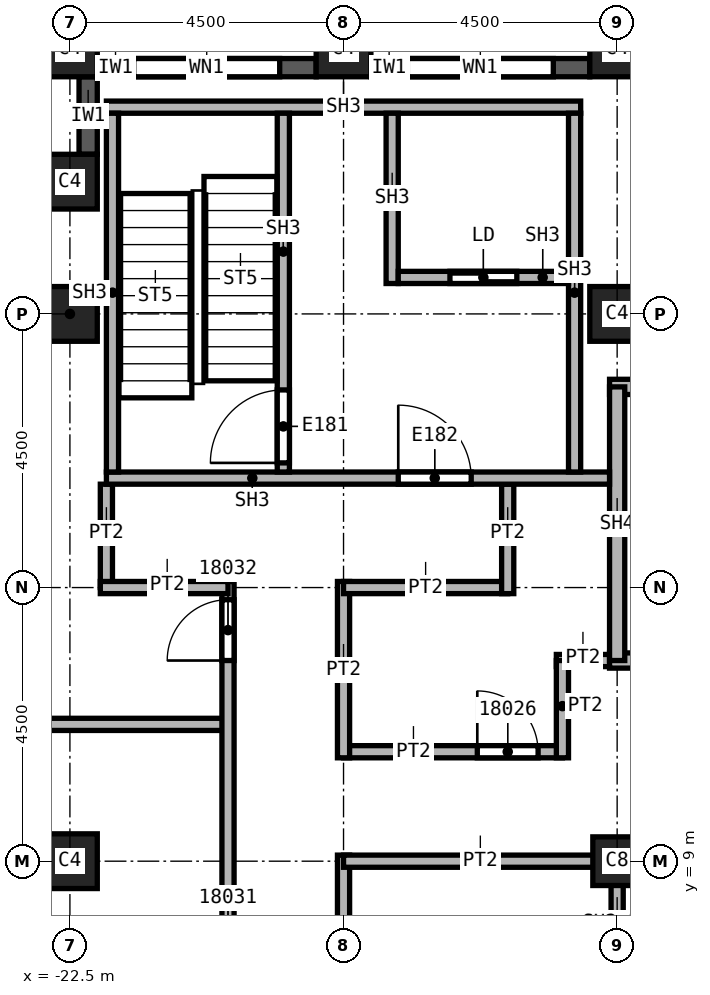
"""IFC4 building model, lengths in metres.
Left out: names, types, materials, properties, quantities, classifications, styles, units other than length and angle.
Written with IfcOpenShell. Run it as: python <this file> out.ifc"""

import sys

from ifc_helpers import new_model, si_unit, direction, frame, frame_2d, origin, origin_2d, place, context, subcontext, project, spatial, rectangle, extrude, element, fill, save


model = new_model("IFC4")
c1 = context("Model", 3, precision=1e-05, world=origin(), true_north=direction((0.0, 1.0)))
c2 = subcontext(c1, "Body", "Model", "MODEL_VIEW")
j1 = project(units=[si_unit("LENGTHUNIT", "METRE"), si_unit("PLANEANGLEUNIT", "RADIAN")], contexts=[c1])
p1 = place(None, origin())
s1 = spatial("IfcSite", under=j1, at=p1, CompositionType="ELEMENT")
p2 = place(p1, origin())
s2 = spatial("IfcBuilding", under=s1, at=p2, CompositionType="ELEMENT")
p3 = place(p2, frame((0.0, 0.0, 266.0)))
s3 = spatial("IfcBuildingStorey", under=s2, at=p3, CompositionType="ELEMENT", Elevation=266.0)
for number, where, z_axis, x_axis in (
    (1, (-13.5, 18.0, 0.0), (0.0, 0.0, 1.0), (1.0, 0.0, 0.0)),
    (2, (-22.5, 9.0, 0.0), (0.0, 0.0, 1.0), (1.0, 0.0, 0.0)),
    (3, (-22.5, 18.0, 0.0), (0.0, 0.0, 1.0), (1.0, 0.0, 0.0)),
):
    element("IfcColumn", number, at=place(p3, frame(where, z_axis=z_axis, x_axis=x_axis)), inside=s3, PredefinedType="COLUMN", context=c2, shape_type="SweptSolid", body=[
        extrude(rectangle(XDim=0.9, YDim=0.9, at=origin_2d()), origin(), (0.0, 0.0, 1.0), 3.72),
    ])
p4 = place(p3, frame((-13.5, 9.0, 0.0), z_axis=(0.0, 0.0, 1.0), x_axis=(1.0, 0.0, 0.0)))
e4 = element("IfcColumn", 4, at=p4, inside=s3, PredefinedType="COLUMN", context=c2, shape_type="SweptSolid", body=[
    extrude(rectangle(XDim=0.8, YDim=0.8, at=origin_2d()), origin(), (0.0, 0.0, 1.0), 3.72),
])
for number, where, z_axis, x_axis in (
    (5, (-13.5, 22.35, 0.0), (0.0, 0.0, 1.0), (1.0, 0.0, 0.0)),
    (6, (-18.0, 22.35, 0.0), (0.0, 0.0, 1.0), (1.0, 0.0, 0.0)),
    (7, (-22.5, 22.35, 0.0), (0.0, 0.0, 1.0), (1.0, 0.0, 0.0)),
    (8, (-22.5, 20.175, 0.0), (0.0, 0.0, 1.0), (1.0, 0.0, 0.0)),
):
    element("IfcColumn", number, at=place(p3, frame(where, z_axis=z_axis, x_axis=x_axis)), inside=s3, PredefinedType="COLUMN", context=c2, shape_type="SweptSolid", body=[
        extrude(rectangle(XDim=0.9, YDim=0.9, at=origin_2d()), origin(), (0.0, 0.0, 1.0), 3.72),
    ])
p5 = place(p3, frame((-13.95, 22.05, 0.0), z_axis=(0.0, 0.0, 1.0), x_axis=(-1.0, 0.0, 0.0)))
e9 = element("IfcWall", 9, at=p5, inside=s3, PredefinedType="SOLIDWALL", context=c2, shape_type="SweptSolid", body=[
    extrude(rectangle(XDim=3.6, YDim=0.3, at=frame_2d((1.8, 0.0))), origin(), (0.0, 0.0, 1.0), 3.12),
])
p6 = place(p5, frame((0.6, 0.0, 0.8)))
e10 = element("IfcOpeningElement", 10, at=p6, cuts=e9, PredefinedType="OPENING", context=c2, shape_type="SweptSolid", body=[
    extrude(rectangle(XDim=2.4, YDim=1.95, at=frame_2d((1.2, 0.975))), frame((0.0, 0.15, 0.0), z_axis=(0.0, -1.0, 0.0), x_axis=(1.0, 0.0, 0.0)), (0.0, 0.0, 1.0), 0.3),
])
p7 = place(p3, frame((-18.45, 22.05, 0.0), z_axis=(0.0, 0.0, 1.0), x_axis=(-1.0, 0.0, 0.0)))
e11 = element("IfcWall", 11, at=p7, inside=s3, PredefinedType="SOLIDWALL", context=c2, shape_type="SweptSolid", body=[
    extrude(rectangle(XDim=3.6, YDim=0.3, at=frame_2d((1.8, 0.0))), origin(), (0.0, 0.0, 1.0), 3.12),
])
p8 = place(p7, frame((0.6, 0.0, 0.8)))
e12 = element("IfcOpeningElement", 12, at=p8, cuts=e11, PredefinedType="OPENING", context=c2, shape_type="SweptSolid", body=[
    extrude(rectangle(XDim=2.4, YDim=1.95, at=frame_2d((1.2, 0.975))), frame((0.0, 0.15, 0.0), z_axis=(0.0, -1.0, 0.0), x_axis=(1.0, 0.0, 0.0)), (0.0, 0.0, 1.0), 0.3),
])
p9 = place(p3, frame((-22.2, 21.9, 0.0), z_axis=(0.0, 0.0, 1.0), x_axis=(0.0, -1.0, 0.0)))
e13 = element("IfcWall", 13, at=p9, inside=s3, PredefinedType="SOLIDWALL", context=c2, shape_type="SweptSolid", body=[
    extrude(rectangle(XDim=1.275, YDim=0.3, at=frame_2d((0.637, 0.0))), origin(), (0.0, 0.0, 1.0), 3.12),
])
p10 = place(p3, frame((-26.55, 11.25, 0.0), z_axis=(0.0, 0.0, 1.0), x_axis=(1.0, 0.0, 0.0)))
e14 = element("IfcWall", 14, at=p10, inside=s3, PredefinedType="PARTITIONING", context=c2, shape_type="SweptSolid", body=[
    extrude(rectangle(XDim=6.65, YDim=0.2, at=frame_2d((3.325, 0.0))), origin(), (0.0, 0.0, 1.0), 3.72),
])
p11 = place(p3, frame((-21.9, 13.5, 0.0), z_axis=(0.0, 0.0, 1.0), x_axis=(0.0, 1.0, 0.0)))
e15 = element("IfcWall", 15, at=p11, inside=s3, PredefinedType="PARTITIONING", context=c2, shape_type="SweptSolid", body=[
    extrude(rectangle(XDim=1.7, YDim=0.2, at=frame_2d((0.85, 0.0))), origin(), (0.0, 0.0, 1.0), 3.72),
])
p12 = place(p3, frame((-19.9, -21.9, 0.0), z_axis=(0.0, 0.0, 1.0), x_axis=(0.0, 1.0, 0.0)))
e16 = element("IfcWall", 16, at=p12, inside=s3, PredefinedType="PARTITIONING", context=c2, shape_type="SweptSolid", body=[
    extrude(rectangle(XDim=35.5, YDim=0.2, at=frame_2d((17.75, 0.0))), origin(), (0.0, 0.0, 1.0), 3.72),
])
p13 = place(p12, frame((22.95, 0.0, 0.0)))
e17 = element("IfcOpeningElement", 17, at=p13, cuts=e16, PredefinedType="OPENING", context=c2, shape_type="SweptSolid", body=[
    extrude(rectangle(XDim=1.0, YDim=2.1, at=frame_2d((0.5, 1.05))), frame((0.0, 0.1, 0.0), z_axis=(0.0, -1.0, 0.0), x_axis=(1.0, 0.0, 0.0)), (0.0, 0.0, 1.0), 0.2),
])
p14 = place(p12, frame((28.8, 0.0, 0.0)))
e18 = element("IfcOpeningElement", 18, at=p14, cuts=e16, PredefinedType="OPENING", context=c2, shape_type="SweptSolid", body=[
    extrude(rectangle(XDim=1.0, YDim=2.1, at=frame_2d((0.5, 1.05))), frame((0.0, 0.1, 0.0), z_axis=(0.0, -1.0, 0.0), x_axis=(1.0, 0.0, 0.0)), (0.0, 0.0, 1.0), 0.2),
])
p15 = place(p12, frame((34.2, 0.0, 0.0)))
e19 = element("IfcOpeningElement", 19, at=p15, cuts=e16, PredefinedType="OPENING", context=c2, shape_type="SweptSolid", body=[
    extrude(rectangle(XDim=1.0, YDim=2.1, at=frame_2d((0.5, 1.05))), frame((0.0, 0.1, 0.0), z_axis=(0.0, -1.0, 0.0), x_axis=(1.0, 0.0, 0.0)), (0.0, 0.0, 1.0), 0.2),
])
p16 = place(p12, frame((4.45, 0.0, 0.0)))
e20 = element("IfcOpeningElement", 20, at=p16, cuts=e16, PredefinedType="OPENING", context=c2, shape_type="SweptSolid", body=[
    extrude(rectangle(XDim=1.0, YDim=2.1, at=frame_2d((0.5, 1.05))), frame((0.0, 0.1, 0.0), z_axis=(0.0, -1.0, 0.0), x_axis=(1.0, 0.0, 0.0)), (0.0, 0.0, 1.0), 0.2),
])
p17 = place(p12, frame((14.4, 0.0, 0.0)))
e21 = element("IfcOpeningElement", 21, at=p17, cuts=e16, PredefinedType="OPENING", context=c2, shape_type="SweptSolid", body=[
    extrude(rectangle(XDim=1.0, YDim=2.1, at=frame_2d((0.5, 1.05))), frame((0.0, 0.1, 0.0), z_axis=(0.0, -1.0, 0.0), x_axis=(1.0, 0.0, 0.0)), (0.0, 0.0, 1.0), 0.2),
])
p18 = place(p3, frame((-19.9, 13.5, 0.0), z_axis=(0.0, 0.0, 1.0), x_axis=(-1.0, 0.0, 0.0)))
e22 = element("IfcWall", 22, at=p18, inside=s3, PredefinedType="PARTITIONING", context=c2, shape_type="SweptSolid", body=[
    extrude(rectangle(XDim=2.1, YDim=0.2, at=frame_2d((1.05, 0.0))), origin(), (0.0, 0.0, 1.0), 3.72),
])
p19 = place(p3, frame((-18.0, 9.1, 0.0), z_axis=(0.0, 0.0, 1.0), x_axis=(0.0, -1.0, 0.0)))
e23 = element("IfcWall", 23, at=p19, inside=s3, PredefinedType="PARTITIONING", context=c2, shape_type="SweptSolid", body=[
    extrude(rectangle(XDim=18.2, YDim=0.2, at=frame_2d((9.1, 0.0))), origin(), (0.0, 0.0, 1.0), 3.72),
])
p20 = place(p19, frame((12.25, 0.0, 0.0)))
e24 = element("IfcOpeningElement", 24, at=p20, cuts=e23, PredefinedType="OPENING", context=c2, shape_type="SweptSolid", body=[
    extrude(rectangle(XDim=1.0, YDim=2.1, at=frame_2d((0.5, 1.05))), frame((0.0, 0.1, 0.0), z_axis=(0.0, -1.0, 0.0), x_axis=(1.0, 0.0, 0.0)), (0.0, 0.0, 1.0), 0.2),
])
p21 = place(p19, frame((2.35, 0.0, 0.0)))
e25 = element("IfcOpeningElement", 25, at=p21, cuts=e23, PredefinedType="OPENING", context=c2, shape_type="SweptSolid", body=[
    extrude(rectangle(XDim=1.0, YDim=2.1, at=frame_2d((0.5, 1.05))), frame((0.0, 0.1, 0.0), z_axis=(0.0, -1.0, 0.0), x_axis=(1.0, 0.0, 0.0)), (0.0, 0.0, 1.0), 0.2),
])
p22 = place(p3, frame((-18.0, 10.8, 0.0), z_axis=(0.0, 0.0, 1.0), x_axis=(1.0, 0.0, 0.0)))
e26 = element("IfcWall", 26, at=p22, inside=s3, PredefinedType="PARTITIONING", context=c2, shape_type="SweptSolid", body=[
    extrude(rectangle(XDim=3.6, YDim=0.2, at=frame_2d((1.8, 0.0))), origin(), (0.0, 0.0, 1.0), 3.72),
])
p23 = place(p22, frame((2.2, 0.0, 0.0)))
e27 = element("IfcOpeningElement", 27, at=p23, cuts=e26, PredefinedType="OPENING", context=c2, shape_type="SweptSolid", body=[
    extrude(rectangle(XDim=1.0, YDim=2.1, at=frame_2d((0.5, 1.05))), frame((0.0, 0.1, 0.0), z_axis=(0.0, -1.0, 0.0), x_axis=(1.0, 0.0, 0.0)), (0.0, 0.0, 1.0), 0.2),
])
p24 = place(p3, frame((-18.0, 13.6, 0.0), z_axis=(0.0, 0.0, 1.0), x_axis=(0.0, -1.0, 0.0)))
e28 = element("IfcWall", 28, at=p24, inside=s3, PredefinedType="PARTITIONING", context=c2, shape_type="SweptSolid", body=[
    extrude(rectangle(XDim=2.9, YDim=0.2, at=frame_2d((1.45, 0.0))), origin(), (0.0, 0.0, 1.0), 3.72),
])
p25 = place(p3, frame((-15.3, 13.5, 0.0), z_axis=(0.0, 0.0, 1.0), x_axis=(-1.0, 0.0, 0.0)))
e29 = element("IfcWall", 29, at=p25, inside=s3, PredefinedType="PARTITIONING", context=c2, shape_type="SweptSolid", body=[
    extrude(rectangle(XDim=2.7, YDim=0.2, at=frame_2d((1.35, 0.0))), origin(), (0.0, 0.0, 1.0), 3.72),
])
p26 = place(p3, frame((-15.3, 15.2, 0.0), z_axis=(0.0, 0.0, 1.0), x_axis=(0.0, -1.0, 0.0)))
e30 = element("IfcWall", 30, at=p26, inside=s3, PredefinedType="PARTITIONING", context=c2, shape_type="SweptSolid", body=[
    extrude(rectangle(XDim=1.8, YDim=0.2, at=frame_2d((0.9, 0.0))), origin(), (0.0, 0.0, 1.0), 3.72),
])
p27 = place(p3, frame((-14.5, 12.3, 0.0), z_axis=(0.0, 0.0, 1.0), x_axis=(1.0, 0.0, 0.0)))
e31 = element("IfcWall", 31, at=p27, inside=s3, PredefinedType="PARTITIONING", context=c2, shape_type="SweptSolid", body=[
    extrude(rectangle(XDim=1.125, YDim=0.2, at=frame_2d((0.562, 0.0))), origin(), (0.0, 0.0, 1.0), 3.72),
])
p28 = place(p3, frame((-13.5, 9.0, 0.0), z_axis=(0.0, 0.0, 1.0), x_axis=(-1.0, 0.0, 0.0)))
e32 = element("IfcWall", 32, at=p28, inside=s3, PredefinedType="PARTITIONING", context=c2, shape_type="SweptSolid", body=[
    extrude(rectangle(XDim=4.5, YDim=0.2, at=frame_2d((2.25, 0.0))), origin(), (0.0, 0.0, 1.0), 3.72),
])
p29 = place(p3, frame((-14.4, 10.7, 0.0), z_axis=(0.0, 0.0, 1.0), x_axis=(0.0, 1.0, 0.0)))
e33 = element("IfcWall", 33, at=p29, inside=s3, PredefinedType="PARTITIONING", context=c2, shape_type="SweptSolid", body=[
    extrude(rectangle(XDim=1.6, YDim=0.2, at=frame_2d((0.8, 0.0))), origin(), (0.0, 0.0, 1.0), 3.72),
])
p30 = place(p3, frame((-13.6, 9.0, 0.0), z_axis=(0.0, 0.0, 1.0), x_axis=(1.0, 0.0, 0.0)))
e34 = element("IfcWall", 34, at=p30, inside=s3, PredefinedType="SOLIDWALL", context=c2, shape_type="SweptSolid", body=[
    extrude(rectangle(XDim=3.1, YDim=0.2, at=frame_2d((1.55, 0.0))), origin(), (0.0, 0.0, 1.0), 3.042),
])
p31 = place(p30, frame((0.85, 0.0, 0.0)))
e35 = element("IfcOpeningElement", 35, at=p31, cuts=e34, PredefinedType="OPENING", context=c2, shape_type="SweptSolid", body=[
    extrude(rectangle(XDim=1.1, YDim=2.1, at=frame_2d((0.55, 1.05))), frame((0.0, 0.1, 0.0), z_axis=(0.0, -1.0, 0.0), x_axis=(1.0, 0.0, 0.0)), (0.0, 0.0, 1.0), 0.2),
])
p32 = place(p3, frame((-13.5, 7.0, 0.0), z_axis=(0.0, 0.0, 1.0), x_axis=(0.0, 1.0, 0.0)))
e36 = element("IfcWall", 36, at=p32, inside=s3, PredefinedType="SOLIDWALL", context=c2, shape_type="SweptSolid", body=[
    extrude(rectangle(XDim=2.1, YDim=0.2, at=frame_2d((1.05, 0.0))), origin(), (0.0, 0.0, 1.0), 3.042),
])
p33 = place(p3, frame((-13.625, 12.3, 0.0), z_axis=(0.0, 0.0, 1.0), x_axis=(1.0, 0.0, 0.0)))
e37 = element("IfcWall", 37, at=p33, inside=s3, PredefinedType="SOLIDWALL", context=c2, shape_type="SweptSolid", body=[
    extrude(rectangle(XDim=9.25, YDim=0.25, at=frame_2d((4.625, 0.0))), origin(), (0.0, 0.0, 1.0), 3.72),
])
p34 = place(p33, frame((0.85, 0.0, 0.0)))
e38 = element("IfcOpeningElement", 38, at=p34, cuts=e37, PredefinedType="OPENING", context=c2, shape_type="SweptSolid", body=[
    extrude(rectangle(XDim=1.2, YDim=2.1, at=frame_2d((0.6, 1.05))), frame((0.0, 0.125, 0.0), z_axis=(0.0, -1.0, 0.0), x_axis=(1.0, 0.0, 0.0)), (0.0, 0.0, 1.0), 0.25),
])
p35 = place(p3, frame((-13.625, 16.8, 0.0), z_axis=(0.0, 0.0, 1.0), x_axis=(1.0, 0.0, 0.0)))
e39 = element("IfcWall", 39, at=p35, inside=s3, PredefinedType="SOLIDWALL", context=c2, shape_type="SweptSolid", body=[
    extrude(rectangle(XDim=9.25, YDim=0.25, at=frame_2d((4.625, 0.0))), origin(), (0.0, 0.0, 1.0), 3.72),
])
p36 = place(p3, frame((-13.5, 12.3, 0.0), z_axis=(0.0, 0.0, 1.0), x_axis=(0.0, 1.0, 0.0)))
e40 = element("IfcWall", 40, at=p36, inside=s3, PredefinedType="SOLIDWALL", context=c2, shape_type="SweptSolid", body=[
    extrude(rectangle(XDim=4.5, YDim=0.25, at=frame_2d((2.25, 0.0))), origin(), (0.0, 0.0, 1.0), 3.72),
])
p37 = place(p3, frame((-21.9, 15.3, 0.0), z_axis=(0.0, 0.0, 1.0), x_axis=(1.0, 0.0, 0.0)))
e41 = element("IfcWall", 41, at=p37, inside=s3, PredefinedType="SOLIDWALL", context=c2, shape_type="SweptSolid", body=[
    extrude(rectangle(XDim=8.275, YDim=0.2, at=frame_2d((4.137, 0.0))), origin(), (0.0, 0.0, 1.0), 3.72),
])
p38 = place(p37, frame((4.8, 0.0, 0.0)))
e42 = element("IfcOpeningElement", 42, at=p38, cuts=e41, PredefinedType="OPENING", context=c2, shape_type="SweptSolid", body=[
    extrude(rectangle(XDim=1.2, YDim=2.1, at=frame_2d((0.6, 1.05))), frame((0.0, 0.1, 0.0), z_axis=(0.0, -1.0, 0.0), x_axis=(1.0, 0.0, 0.0)), (0.0, 0.0, 1.0), 0.2),
])
p39 = place(p3, frame((-21.9, 21.4, 0.0), z_axis=(0.0, 0.0, 1.0), x_axis=(1.0, 0.0, 0.0)))
e43 = element("IfcWall", 43, at=p39, inside=s3, PredefinedType="SOLIDWALL", context=c2, shape_type="SweptSolid", body=[
    extrude(rectangle(XDim=7.8, YDim=0.2, at=frame_2d((3.9, 0.0))), origin(), (0.0, 0.0, 1.0), 3.72),
])
for number, where, z_axis, x_axis in (
    (44, (-21.8, 15.4, 0.0), (0.0, 0.0, 1.0), (0.0, 1.0, 0.0)),
    (45, (-14.2, 15.4, 0.0), (0.0, 0.0, 1.0), (0.0, 1.0, 0.0)),
):
    element("IfcWall", number, at=place(p3, frame(where, z_axis=z_axis, x_axis=x_axis)), inside=s3, PredefinedType="SOLIDWALL", context=c2, shape_type="SweptSolid", body=[
        extrude(rectangle(XDim=5.9, YDim=0.2, at=frame_2d((2.95, 0.0))), origin(), (0.0, 0.0, 1.0), 3.72),
    ])
p40 = place(p3, frame((-18.99, 15.4, 0.0), z_axis=(0.0, 0.0, 1.0), x_axis=(0.0, 1.0, 0.0)))
e46 = element("IfcWall", 46, at=p40, inside=s3, PredefinedType="SOLIDWALL", context=c2, shape_type="SweptSolid", body=[
    extrude(rectangle(XDim=5.9, YDim=0.2, at=frame_2d((2.95, 0.0))), origin(), (0.0, 0.0, 1.0), 3.72),
])
p41 = place(p40, frame((0.15, 0.0, 0.0)))
e47 = element("IfcOpeningElement", 47, at=p41, cuts=e46, PredefinedType="OPENING", context=c2, shape_type="SweptSolid", body=[
    extrude(rectangle(XDim=1.2, YDim=2.1, at=frame_2d((0.6, 1.05))), frame((0.0, 0.1, 0.0), z_axis=(0.0, -1.0, 0.0), x_axis=(1.0, 0.0, 0.0)), (0.0, 0.0, 1.0), 0.2),
])
p42 = place(p3, frame((-17.2, 18.5, 0.0), z_axis=(0.0, 0.0, 1.0), x_axis=(0.0, 1.0, 0.0)))
e48 = element("IfcWall", 48, at=p42, inside=s3, PredefinedType="SOLIDWALL", context=c2, shape_type="SweptSolid", body=[
    extrude(rectangle(XDim=2.8, YDim=0.2, at=frame_2d((1.4, 0.0))), origin(), (0.0, 0.0, 1.0), 3.72),
])
p43 = place(p3, frame((-17.1, 18.6, 0.0), z_axis=(0.0, 0.0, 1.0), x_axis=(1.0, 0.0, 0.0)))
e49 = element("IfcWall", 49, at=p43, inside=s3, PredefinedType="SOLIDWALL", context=c2, shape_type="SweptSolid", body=[
    extrude(rectangle(XDim=2.8, YDim=0.2, at=frame_2d((1.4, 0.0))), origin(), (0.0, 0.0, 1.0), 3.72),
])
p44 = place(p43, frame((0.85, 0.0, 0.0)))
e50 = element("IfcOpeningElement", 50, at=p44, cuts=e49, PredefinedType="OPENING", context=c2, shape_type="SweptSolid", body=[
    extrude(rectangle(XDim=1.1, YDim=2.1, at=frame_2d((0.55, 1.05))), frame((0.0, 0.1, 0.0), z_axis=(0.0, -1.0, 0.0), x_axis=(1.0, 0.0, 0.0)), (0.0, 0.0, 1.0), 0.2),
])
p45 = place(p6, origin())
e51 = element("IfcWindow", 51, at=p45, inside=s3, PartitioningType="SINGLE_PANEL", PredefinedType="WINDOW", context=c2, shape_type="SweptSolid", body=[
    extrude(rectangle(XDim=2.4, YDim=1.95, at=frame_2d((1.2, 0.975))), frame((0.0, 0.03, 0.0), z_axis=(0.0, -1.0, 0.0), x_axis=(1.0, 0.0, 0.0)), (0.0, 0.0, 1.0), 0.06),
])
fill(e10, e51)
p46 = place(p8, origin())
e52 = element("IfcWindow", 52, at=p46, inside=s3, PartitioningType="SINGLE_PANEL", PredefinedType="WINDOW", context=c2, shape_type="SweptSolid", body=[
    extrude(rectangle(XDim=2.4, YDim=1.95, at=frame_2d((1.2, 0.975))), frame((0.0, 0.03, 0.0), z_axis=(0.0, -1.0, 0.0), x_axis=(1.0, 0.0, 0.0)), (0.0, 0.0, 1.0), 0.06),
])
fill(e12, e52)
p47 = place(p23, origin())
e53 = element("IfcDoor", 53, at=p47, inside=s3, OperationType="SINGLE_SWING_LEFT", PredefinedType="DOOR", context=c2, shape_type="SweptSolid", body=[
    extrude(rectangle(XDim=1.0, YDim=2.1, at=frame_2d((0.5, 1.05))), frame((0.0, 0.025, 0.0), z_axis=(0.0, -1.0, 0.0), x_axis=(1.0, 0.0, 0.0)), (0.0, 0.0, 1.0), 0.05),
])
fill(e27, e53)
p48 = place(p15, origin())
e54 = element("IfcDoor", 54, at=p48, inside=s3, OperationType="SINGLE_SWING_LEFT", PredefinedType="DOOR", context=c2, shape_type="SweptSolid", body=[
    extrude(rectangle(XDim=1.0, YDim=2.1, at=frame_2d((0.5, 1.05))), frame((0.0, 0.025, 0.0), z_axis=(0.0, -1.0, 0.0), x_axis=(1.0, 0.0, 0.0)), (0.0, 0.0, 1.0), 0.05),
])
fill(e19, e54)
p49 = place(p41, origin())
e55 = element("IfcDoor", 55, at=p49, inside=s3, OperationType="SINGLE_SWING_LEFT", PredefinedType="DOOR", context=c2, shape_type="SweptSolid", body=[
    extrude(rectangle(XDim=1.2, YDim=2.1, at=frame_2d((0.6, 1.05))), frame((0.0, 0.025, 0.0), z_axis=(0.0, -1.0, 0.0), x_axis=(1.0, 0.0, 0.0)), (0.0, 0.0, 1.0), 0.05),
])
fill(e47, e55)
p50 = place(p44, origin())
e56 = element("IfcDoor", 56, at=p50, inside=s3, OperationType="SLIDING_TO_LEFT", PredefinedType="DOOR", context=c2, shape_type="SweptSolid", body=[
    extrude(rectangle(XDim=1.1, YDim=2.1, at=frame_2d((0.55, 1.05))), frame((0.0, 0.025, 0.0), z_axis=(0.0, -1.0, 0.0), x_axis=(1.0, 0.0, 0.0)), (0.0, 0.0, 1.0), 0.05),
])
fill(e50, e56)
p51 = place(p38, origin())
e57 = element("IfcDoor", 57, at=p51, inside=s3, OperationType="SINGLE_SWING_RIGHT", PredefinedType="DOOR", context=c2, shape_type="SweptSolid", body=[
    extrude(rectangle(XDim=1.2, YDim=2.1, at=frame_2d((0.6, 1.05))), frame((0.0, 0.025, 0.0), z_axis=(0.0, -1.0, 0.0), x_axis=(1.0, 0.0, 0.0)), (0.0, 0.0, 1.0), 0.05),
])
fill(e42, e57)
save(model, sys.argv[1])
